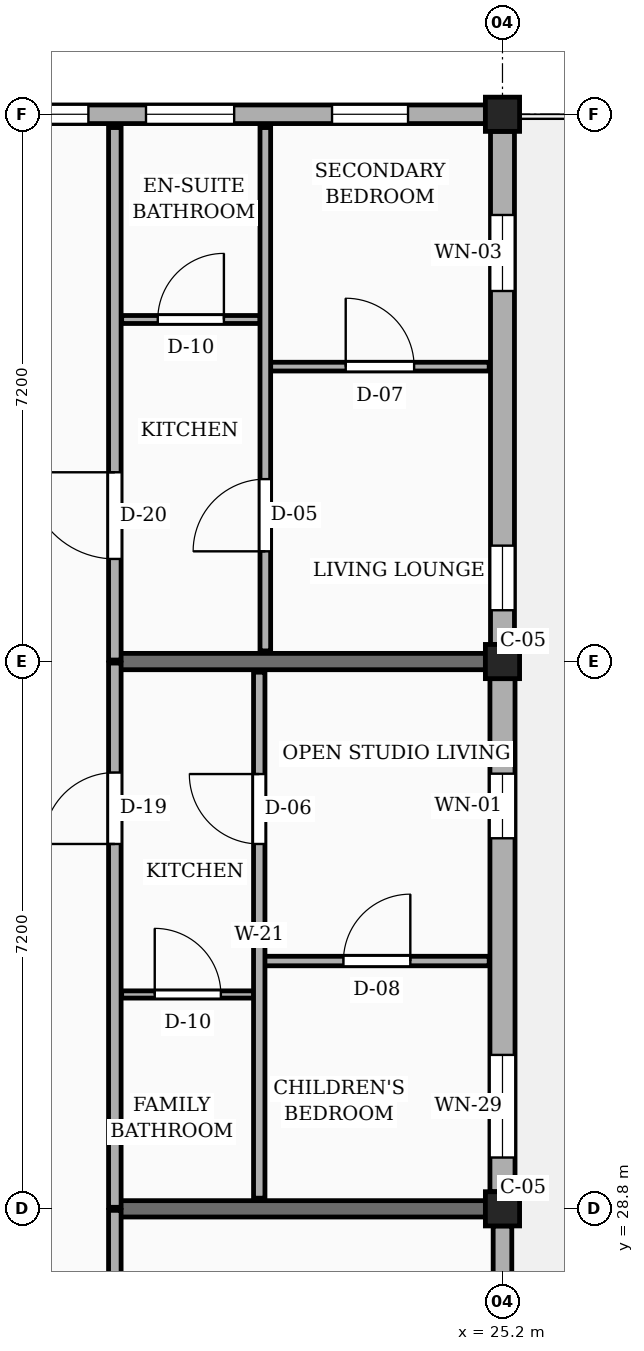
"""IFC4 building model, lengths in metres.
Left out: names, types, materials, properties, quantities, classifications, styles, units other than length and angle.
Written with IfcOpenShell. Run it as: python <this file> out.ifc"""

import sys

from ifc_helpers import new_model, si_unit, direction, frame, frame_2d, origin, origin_2d, place, context, subcontext, project, spatial, rectangle, extrude, element, fill, save


model = new_model("IFC4")
c1 = context("Model", 3, precision=1e-05, world=origin(), true_north=direction((0.0, 1.0)))
c2 = subcontext(c1, "Body", "Model", "MODEL_VIEW")
j1 = project(units=[si_unit("LENGTHUNIT", "METRE"), si_unit("PLANEANGLEUNIT", "RADIAN")], contexts=[c1])
p1 = place(None, origin())
s1 = spatial("IfcSite", under=j1, at=p1, CompositionType="ELEMENT")
p2 = place(p1, origin())
s2 = spatial("IfcBuilding", under=s1, at=p2, CompositionType="ELEMENT")
p3 = place(p2, frame((0.0, 0.0, 36.0)))
s3 = spatial("IfcBuildingStorey", under=s2, at=p3, CompositionType="ELEMENT", Elevation=36.0)
for number, where, z_axis, x_axis in (
    (1, (25.2, 28.8, 0.0), (0.0, 0.0, 1.0), (1.0, 0.0, 0.0)),
    (2, (25.2, 36.0, 0.0), (0.0, 0.0, 1.0), (1.0, 0.0, 0.0)),
    (3, (25.2, 43.2, 0.0), (0.0, 0.0, 1.0), (1.0, 0.0, 0.0)),
):
    element("IfcColumn", number, at=place(p3, frame(where, z_axis=z_axis, x_axis=x_axis)), inside=s3, PredefinedType="COLUMN", context=c2, shape_type="SweptSolid", body=[
        extrude(rectangle(XDim=0.45, YDim=0.45, at=origin_2d()), origin(), (0.0, 0.0, 1.0), 3.15),
    ])
for number, where, z_axis, x_axis in (
    (4, (20.1, 28.8, 0.0), (0.0, 0.0, 1.0), (1.0, 0.0, 0.0)),
    (5, (20.1, 36.0, 0.0), (0.0, 0.0, 1.0), (1.0, 0.0, 0.0)),
):
    element("IfcWall", number, at=place(p3, frame(where, z_axis=z_axis, x_axis=x_axis)), inside=s3, PredefinedType="SOLIDWALL", context=c2, shape_type="SweptSolid", body=[
        extrude(rectangle(XDim=4.875, YDim=0.215, at=frame_2d((2.438, 0.0))), origin(), (0.0, 0.0, 1.0), 2.17),
    ])
p4 = place(p3, frame((25.2, 21.825, 0.0), z_axis=(0.0, 0.0, 1.0), x_axis=(0.0, 1.0, 0.0)))
e6 = element("IfcWall", 6, at=p4, inside=s3, PredefinedType="SOLIDWALL", context=c2, shape_type="SweptSolid", body=[
    extrude(rectangle(XDim=6.75, YDim=0.245, at=frame_2d((3.375, 0.0))), origin(), (0.0, 0.0, 1.0), 2.44),
])
p5 = place(p4, frame((2.8, 0.0, 0.0)))
e7 = element("IfcOpeningElement", 7, at=p5, cuts=e6, PredefinedType="OPENING", context=c2, shape_type="SweptSolid", body=[
    extrude(rectangle(XDim=1.15, YDim=2.12, at=frame_2d((0.575, 1.06))), frame((0.0, 0.133, 0.0), z_axis=(0.0, -1.0, 0.0), x_axis=(1.0, 0.0, 0.0)), (0.0, 0.0, 1.0), 0.265),
])
p6 = place(p4, frame((0.65, 0.0, 0.78)))
e8 = element("IfcOpeningElement", 8, at=p6, cuts=e6, PredefinedType="OPENING", context=c2, shape_type="SweptSolid", body=[
    extrude(rectangle(XDim=1.16, YDim=1.15, at=frame_2d((0.58, 0.575))), frame((0.0, 0.133, 0.0), z_axis=(0.0, -1.0, 0.0), x_axis=(1.0, 0.0, 0.0)), (0.0, 0.0, 1.0), 0.265),
])
p7 = place(p3, frame((25.2, 29.025, 0.0), z_axis=(0.0, 0.0, 1.0), x_axis=(0.0, 1.0, 0.0)))
e9 = element("IfcWall", 9, at=p7, inside=s3, PredefinedType="SOLIDWALL", context=c2, shape_type="SweptSolid", body=[
    extrude(rectangle(XDim=6.75, YDim=0.33, at=frame_2d((3.375, 0.0))), origin(), (0.0, 0.0, 1.0), 2.44),
])
p8 = place(p7, frame((0.45, 0.0, 0.78)))
e10 = element("IfcOpeningElement", 10, at=p8, cuts=e9, PredefinedType="OPENING", context=c2, shape_type="SweptSolid", body=[
    extrude(rectangle(XDim=1.35, YDim=1.44, at=frame_2d((0.675, 0.72))), frame((0.0, 0.175, 0.0), z_axis=(0.0, -1.0, 0.0), x_axis=(1.0, 0.0, 0.0)), (0.0, 0.0, 1.0), 0.35),
])
p9 = place(p7, frame((4.65, 0.0, 0.78)))
e11 = element("IfcOpeningElement", 11, at=p9, cuts=e9, PredefinedType="OPENING", context=c2, shape_type="SweptSolid", body=[
    extrude(rectangle(XDim=0.85, YDim=1.15, at=frame_2d((0.425, 0.575))), frame((0.0, 0.175, 0.0), z_axis=(0.0, -1.0, 0.0), x_axis=(1.0, 0.0, 0.0)), (0.0, 0.0, 1.0), 0.35),
])
p10 = place(p3, frame((25.2, 36.225, 0.0), z_axis=(0.0, 0.0, 1.0), x_axis=(0.0, 1.0, 0.0)))
e12 = element("IfcWall", 12, at=p10, inside=s3, PredefinedType="SOLIDWALL", context=c2, shape_type="SweptSolid", body=[
    extrude(rectangle(XDim=6.75, YDim=0.315, at=frame_2d((3.375, 0.0))), origin(), (0.0, 0.0, 1.0), 2.44),
])
p11 = place(p10, frame((0.45, 0.0, 0.78)))
e13 = element("IfcOpeningElement", 13, at=p11, cuts=e12, PredefinedType="OPENING", context=c2, shape_type="SweptSolid", body=[
    extrude(rectangle(XDim=0.85, YDim=1.15, at=frame_2d((0.425, 0.575))), frame((0.0, 0.167, 0.0), z_axis=(0.0, -1.0, 0.0), x_axis=(1.0, 0.0, 0.0)), (0.0, 0.0, 1.0), 0.335),
])
p12 = place(p10, frame((4.65, 0.0, 0.78)))
e14 = element("IfcOpeningElement", 14, at=p12, cuts=e12, PredefinedType="OPENING", context=c2, shape_type="SweptSolid", body=[
    extrude(rectangle(XDim=1.0, YDim=1.15, at=frame_2d((0.5, 0.575))), frame((0.0, 0.167, 0.0), z_axis=(0.0, -1.0, 0.0), x_axis=(1.0, 0.0, 0.0)), (0.0, 0.0, 1.0), 0.335),
])
p13 = place(p3, frame((24.975, 43.2, 0.0), z_axis=(0.0, 0.0, 1.0), x_axis=(-1.0, 0.0, 0.0)))
e15 = element("IfcWall", 15, at=p13, inside=s3, PredefinedType="SOLIDWALL", context=c2, shape_type="SweptSolid", body=[
    extrude(rectangle(XDim=6.75, YDim=0.245, at=frame_2d((3.375, 0.0))), origin(), (0.0, 0.0, 1.0), 2.44),
])
p14 = place(p13, frame((1.018, 0.0, 0.78)))
e16 = element("IfcOpeningElement", 16, at=p14, cuts=e15, PredefinedType="OPENING", context=c2, shape_type="SweptSolid", body=[
    extrude(rectangle(XDim=1.0, YDim=1.15, at=frame_2d((0.5, 0.575))), frame((0.0, 0.133, 0.0), z_axis=(0.0, -1.0, 0.0), x_axis=(1.0, 0.0, 0.0)), (0.0, 0.0, 1.0), 0.265),
])
p15 = place(p13, frame((3.305, 0.0, 0.78)))
e17 = element("IfcOpeningElement", 17, at=p15, cuts=e15, PredefinedType="OPENING", context=c2, shape_type="SweptSolid", body=[
    extrude(rectangle(XDim=1.16, YDim=1.15, at=frame_2d((0.58, 0.575))), frame((0.0, 0.133, 0.0), z_axis=(0.0, -1.0, 0.0), x_axis=(1.0, 0.0, 0.0)), (0.0, 0.0, 1.0), 0.265),
])
p16 = place(p13, frame((5.222, 0.0, 0.78)))
e18 = element("IfcOpeningElement", 18, at=p16, cuts=e15, PredefinedType="OPENING", context=c2, shape_type="SweptSolid", body=[
    extrude(rectangle(XDim=1.04, YDim=1.26, at=frame_2d((0.52, 0.63))), frame((0.0, 0.133, 0.0), z_axis=(0.0, -1.0, 0.0), x_axis=(1.0, 0.0, 0.0)), (0.0, 0.0, 1.0), 0.265),
])
p17 = place(p3, frame((20.1, 21.62, 0.0), z_axis=(0.0, 0.0, 1.0), x_axis=(0.0, 1.0, 0.0)))
e19 = element("IfcWall", 19, at=p17, inside=s3, PredefinedType="PARTITIONING", context=c2, shape_type="SweptSolid", body=[
    extrude(rectangle(XDim=7.16, YDim=0.165, at=frame_2d((3.58, 0.0))), origin(), (0.0, 0.0, 1.0), 2.305),
])
p18 = place(p17, frame((4.33, 0.0, 0.0)))
e20 = element("IfcOpeningElement", 20, at=p18, cuts=e19, PredefinedType="OPENING", context=c2, shape_type="SweptSolid", body=[
    extrude(rectangle(XDim=1.1, YDim=2.15, at=frame_2d((0.55, 1.075))), frame((0.0, 0.093, 0.0), z_axis=(0.0, -1.0, 0.0), x_axis=(1.0, 0.0, 0.0)), (0.0, 0.0, 1.0), 0.185),
])
p19 = place(p3, frame((20.1, 28.82, 0.0), z_axis=(0.0, 0.0, 1.0), x_axis=(0.0, 1.0, 0.0)))
e21 = element("IfcWall", 21, at=p19, inside=s3, PredefinedType="PARTITIONING", context=c2, shape_type="SweptSolid", body=[
    extrude(rectangle(XDim=7.16, YDim=0.165, at=frame_2d((3.58, 0.0))), origin(), (0.0, 0.0, 1.0), 2.305),
])
p20 = place(p19, frame((4.78, 0.0, 0.0)))
e22 = element("IfcOpeningElement", 22, at=p20, cuts=e21, PredefinedType="OPENING", context=c2, shape_type="SweptSolid", body=[
    extrude(rectangle(XDim=0.94, YDim=2.12, at=frame_2d((0.47, 1.06))), frame((0.0, 0.093, 0.0), z_axis=(0.0, -1.0, 0.0), x_axis=(1.0, 0.0, 0.0)), (0.0, 0.0, 1.0), 0.185),
])
p21 = place(p3, frame((20.1, 36.02, 0.0), z_axis=(0.0, 0.0, 1.0), x_axis=(0.0, 1.0, 0.0)))
e23 = element("IfcWall", 23, at=p21, inside=s3, PredefinedType="PARTITIONING", context=c2, shape_type="SweptSolid", body=[
    extrude(rectangle(XDim=7.005, YDim=0.165, at=frame_2d((3.502, 0.0))), origin(), (0.0, 0.0, 1.0), 2.305),
])
p22 = place(p21, frame((1.33, 0.0, 0.0)))
e24 = element("IfcOpeningElement", 24, at=p22, cuts=e23, PredefinedType="OPENING", context=c2, shape_type="SweptSolid", body=[
    extrude(rectangle(XDim=1.14, YDim=2.18, at=frame_2d((0.57, 1.09))), frame((0.0, 0.093, 0.0), z_axis=(0.0, -1.0, 0.0), x_axis=(1.0, 0.0, 0.0)), (0.0, 0.0, 1.0), 0.185),
])
p23 = place(p3, frame((22.07, 32.06, 0.0), z_axis=(0.0, 0.0, 1.0), x_axis=(1.0, 0.0, 0.0)))
e25 = element("IfcWall", 25, at=p23, inside=s3, PredefinedType="PARTITIONING", context=c2, shape_type="SweptSolid", body=[
    extrude(rectangle(XDim=2.955, YDim=0.125, at=frame_2d((1.478, 0.0))), origin(), (0.0, 0.0, 1.0), 2.305),
])
p24 = place(p23, frame((1.038, 0.0, 0.0)))
e26 = element("IfcOpeningElement", 26, at=p24, cuts=e25, PredefinedType="OPENING", context=c2, shape_type="SweptSolid", body=[
    extrude(rectangle(XDim=0.88, YDim=2.08, at=frame_2d((0.44, 1.04))), frame((0.0, 0.073, 0.0), z_axis=(0.0, -1.0, 0.0), x_axis=(1.0, 0.0, 0.0)), (0.0, 0.0, 1.0), 0.145),
])
p25 = place(p3, frame((20.19, 31.62, 0.0), z_axis=(0.0, 0.0, 1.0), x_axis=(1.0, 0.0, 0.0)))
e27 = element("IfcWall", 27, at=p25, inside=s3, PredefinedType="PARTITIONING", context=c2, shape_type="SweptSolid", body=[
    extrude(rectangle(XDim=1.74, YDim=0.095, at=frame_2d((0.87, 0.0))), origin(), (0.0, 0.0, 1.0), 2.305),
])
p26 = place(p25, frame((0.435, 0.0, 0.0)))
e28 = element("IfcOpeningElement", 28, at=p26, cuts=e27, PredefinedType="OPENING", context=c2, shape_type="SweptSolid", body=[
    extrude(rectangle(XDim=0.87, YDim=2.05, at=frame_2d((0.435, 1.025))), frame((0.0, 0.058, 0.0), z_axis=(0.0, -1.0, 0.0), x_axis=(1.0, 0.0, 0.0)), (0.0, 0.0, 1.0), 0.115),
])
p27 = place(p3, frame((22.0, 28.94, 0.0), z_axis=(0.0, 0.0, 1.0), x_axis=(0.0, 1.0, 0.0)))
e29 = element("IfcWall", 29, at=p27, inside=s3, PredefinedType="PARTITIONING", context=c2, shape_type="SweptSolid", body=[
    extrude(rectangle(XDim=6.92, YDim=0.15, at=frame_2d((3.46, 0.0))), origin(), (0.0, 0.0, 1.0), 2.305),
])
p28 = place(p27, frame((4.66, 0.0, 0.0)))
e30 = element("IfcOpeningElement", 30, at=p28, cuts=e29, PredefinedType="OPENING", context=c2, shape_type="SweptSolid", body=[
    extrude(rectangle(XDim=0.92, YDim=2.1, at=frame_2d((0.46, 1.05))), frame((0.0, 0.085, 0.0), z_axis=(0.0, -1.0, 0.0), x_axis=(1.0, 0.0, 0.0)), (0.0, 0.0, 1.0), 0.17),
])
p29 = place(p3, frame((22.15, 39.88, 0.0), z_axis=(0.0, 0.0, 1.0), x_axis=(1.0, 0.0, 0.0)))
e31 = element("IfcWall", 31, at=p29, inside=s3, PredefinedType="PARTITIONING", context=c2, shape_type="SweptSolid", body=[
    extrude(rectangle(XDim=2.875, YDim=0.115, at=frame_2d((1.438, 0.0))), origin(), (0.0, 0.0, 1.0), 2.305),
])
p30 = place(p29, frame((0.988, 0.0, 0.0)))
e32 = element("IfcOpeningElement", 32, at=p30, cuts=e31, PredefinedType="OPENING", context=c2, shape_type="SweptSolid", body=[
    extrude(rectangle(XDim=0.9, YDim=2.1, at=frame_2d((0.45, 1.05))), frame((0.0, 0.067, 0.0), z_axis=(0.0, -1.0, 0.0), x_axis=(1.0, 0.0, 0.0)), (0.0, 0.0, 1.0), 0.135),
])
p31 = place(p3, frame((20.19, 40.5, 0.0), z_axis=(0.0, 0.0, 1.0), x_axis=(1.0, 0.0, 0.0)))
e33 = element("IfcWall", 33, at=p31, inside=s3, PredefinedType="PARTITIONING", context=c2, shape_type="SweptSolid", body=[
    extrude(rectangle(XDim=1.82, YDim=0.105, at=frame_2d((0.91, 0.0))), origin(), (0.0, 0.0, 1.0), 2.305),
])
p32 = place(p31, frame((0.475, 0.0, 0.0)))
e34 = element("IfcOpeningElement", 34, at=p32, cuts=e33, PredefinedType="OPENING", context=c2, shape_type="SweptSolid", body=[
    extrude(rectangle(XDim=0.87, YDim=2.05, at=frame_2d((0.435, 1.025))), frame((0.0, 0.062, 0.0), z_axis=(0.0, -1.0, 0.0), x_axis=(1.0, 0.0, 0.0)), (0.0, 0.0, 1.0), 0.125),
])
p33 = place(p3, frame((22.08, 36.14, 0.0), z_axis=(0.0, 0.0, 1.0), x_axis=(0.0, 1.0, 0.0)))
e35 = element("IfcWall", 35, at=p33, inside=s3, PredefinedType="PARTITIONING", context=c2, shape_type="SweptSolid", body=[
    extrude(rectangle(XDim=6.885, YDim=0.14, at=frame_2d((3.442, 0.0))), origin(), (0.0, 0.0, 1.0), 2.305),
])
p34 = place(p33, frame((1.31, 0.0, 0.0)))
e36 = element("IfcOpeningElement", 36, at=p34, cuts=e35, PredefinedType="OPENING", context=c2, shape_type="SweptSolid", body=[
    extrude(rectangle(XDim=0.95, YDim=2.1, at=frame_2d((0.475, 1.05))), frame((0.0, 0.08, 0.0), z_axis=(0.0, -1.0, 0.0), x_axis=(1.0, 0.0, 0.0)), (0.0, 0.0, 1.0), 0.16),
])
p35 = place(p8, origin())
e37 = element("IfcWindow", 37, at=p35, inside=s3, PartitioningType="SINGLE_PANEL", PredefinedType="WINDOW", context=c2, shape_type="SweptSolid", body=[
    extrude(rectangle(XDim=1.35, YDim=1.44, at=frame_2d((0.675, 0.72))), frame((0.0, 0.03, 0.0), z_axis=(0.0, -1.0, 0.0), x_axis=(1.0, 0.0, 0.0)), (0.0, 0.0, 1.0), 0.06),
])
fill(e10, e37)
p36 = place(p9, origin())
e38 = element("IfcWindow", 38, at=p36, inside=s3, PartitioningType="SINGLE_PANEL", PredefinedType="WINDOW", context=c2, shape_type="SweptSolid", body=[
    extrude(rectangle(XDim=0.85, YDim=1.15, at=frame_2d((0.425, 0.575))), frame((0.0, 0.03, 0.0), z_axis=(0.0, -1.0, 0.0), x_axis=(1.0, 0.0, 0.0)), (0.0, 0.0, 1.0), 0.06),
])
fill(e11, e38)
p37 = place(p11, origin())
e39 = element("IfcWindow", 39, at=p37, inside=s3, PartitioningType="SINGLE_PANEL", PredefinedType="WINDOW", context=c2, shape_type="SweptSolid", body=[
    extrude(rectangle(XDim=0.85, YDim=1.15, at=frame_2d((0.425, 0.575))), frame((0.0, 0.03, 0.0), z_axis=(0.0, -1.0, 0.0), x_axis=(1.0, 0.0, 0.0)), (0.0, 0.0, 1.0), 0.06),
])
fill(e13, e39)
p38 = place(p12, origin())
e40 = element("IfcWindow", 40, at=p38, inside=s3, PartitioningType="SINGLE_PANEL", PredefinedType="WINDOW", context=c2, shape_type="SweptSolid", body=[
    extrude(rectangle(XDim=1.0, YDim=1.15, at=frame_2d((0.5, 0.575))), frame((0.0, 0.03, 0.0), z_axis=(0.0, -1.0, 0.0), x_axis=(1.0, 0.0, 0.0)), (0.0, 0.0, 1.0), 0.06),
])
fill(e14, e40)
p39 = place(p14, origin())
e41 = element("IfcWindow", 41, at=p39, inside=s3, PartitioningType="SINGLE_PANEL", PredefinedType="WINDOW", context=c2, shape_type="SweptSolid", body=[
    extrude(rectangle(XDim=1.0, YDim=1.15, at=frame_2d((0.5, 0.575))), frame((0.0, 0.03, 0.0), z_axis=(0.0, -1.0, 0.0), x_axis=(1.0, 0.0, 0.0)), (0.0, 0.0, 1.0), 0.06),
])
fill(e16, e41)
p40 = place(p15, origin())
e42 = element("IfcWindow", 42, at=p40, inside=s3, PartitioningType="SINGLE_PANEL", PredefinedType="WINDOW", context=c2, shape_type="SweptSolid", body=[
    extrude(rectangle(XDim=1.16, YDim=1.15, at=frame_2d((0.58, 0.575))), frame((0.0, 0.03, 0.0), z_axis=(0.0, -1.0, 0.0), x_axis=(1.0, 0.0, 0.0)), (0.0, 0.0, 1.0), 0.06),
])
fill(e17, e42)
p41 = place(p16, origin())
e43 = element("IfcWindow", 43, at=p41, inside=s3, PartitioningType="SINGLE_PANEL", PredefinedType="WINDOW", context=c2, shape_type="SweptSolid", body=[
    extrude(rectangle(XDim=1.04, YDim=1.26, at=frame_2d((0.52, 0.63))), frame((0.0, 0.03, 0.0), z_axis=(0.0, -1.0, 0.0), x_axis=(1.0, 0.0, 0.0)), (0.0, 0.0, 1.0), 0.06),
])
fill(e18, e43)
p42 = place(p20, origin())
e44 = element("IfcDoor", 44, at=p42, inside=s3, OperationType="SINGLE_SWING_LEFT", PredefinedType="DOOR", context=c2, shape_type="SweptSolid", body=[
    extrude(rectangle(XDim=0.94, YDim=2.12, at=frame_2d((0.47, 1.06))), frame((0.0, 0.025, 0.0), z_axis=(0.0, -1.0, 0.0), x_axis=(1.0, 0.0, 0.0)), (0.0, 0.0, 1.0), 0.05),
])
fill(e22, e44)
p43 = place(p22, origin())
e45 = element("IfcDoor", 45, at=p43, inside=s3, OperationType="SINGLE_SWING_RIGHT", PredefinedType="DOOR", context=c2, shape_type="SweptSolid", body=[
    extrude(rectangle(XDim=1.14, YDim=2.18, at=frame_2d((0.57, 1.09))), frame((0.0, 0.025, 0.0), z_axis=(0.0, -1.0, 0.0), x_axis=(1.0, 0.0, 0.0)), (0.0, 0.0, 1.0), 0.05),
])
fill(e24, e45)
p44 = place(p24, origin())
e46 = element("IfcDoor", 46, at=p44, inside=s3, OperationType="SINGLE_SWING_RIGHT", PredefinedType="DOOR", context=c2, shape_type="SweptSolid", body=[
    extrude(rectangle(XDim=0.88, YDim=2.08, at=frame_2d((0.44, 1.04))), frame((0.0, 0.025, 0.0), z_axis=(0.0, -1.0, 0.0), x_axis=(1.0, 0.0, 0.0)), (0.0, 0.0, 1.0), 0.05),
])
fill(e26, e46)
p45 = place(p26, origin())
e47 = element("IfcDoor", 47, at=p45, inside=s3, OperationType="SINGLE_SWING_LEFT", PredefinedType="DOOR", context=c2, shape_type="SweptSolid", body=[
    extrude(rectangle(XDim=0.87, YDim=2.05, at=frame_2d((0.435, 1.025))), frame((0.0, 0.025, 0.0), z_axis=(0.0, -1.0, 0.0), x_axis=(1.0, 0.0, 0.0)), (0.0, 0.0, 1.0), 0.05),
])
fill(e28, e47)
p46 = place(p28, origin())
e48 = element("IfcDoor", 48, at=p46, inside=s3, OperationType="SINGLE_SWING_RIGHT", PredefinedType="DOOR", context=c2, shape_type="SweptSolid", body=[
    extrude(rectangle(XDim=0.92, YDim=2.1, at=frame_2d((0.46, 1.05))), frame((0.0, 0.025, 0.0), z_axis=(0.0, -1.0, 0.0), x_axis=(1.0, 0.0, 0.0)), (0.0, 0.0, 1.0), 0.05),
])
fill(e30, e48)
p47 = place(p30, origin())
e49 = element("IfcDoor", 49, at=p47, inside=s3, OperationType="SINGLE_SWING_LEFT", PredefinedType="DOOR", context=c2, shape_type="SweptSolid", body=[
    extrude(rectangle(XDim=0.9, YDim=2.1, at=frame_2d((0.45, 1.05))), frame((0.0, 0.025, 0.0), z_axis=(0.0, -1.0, 0.0), x_axis=(1.0, 0.0, 0.0)), (0.0, 0.0, 1.0), 0.05),
])
fill(e32, e49)
p48 = place(p32, origin())
e50 = element("IfcDoor", 50, at=p48, inside=s3, OperationType="SINGLE_SWING_RIGHT", PredefinedType="DOOR", context=c2, shape_type="SweptSolid", body=[
    extrude(rectangle(XDim=0.87, YDim=2.05, at=frame_2d((0.435, 1.025))), frame((0.0, 0.025, 0.0), z_axis=(0.0, -1.0, 0.0), x_axis=(1.0, 0.0, 0.0)), (0.0, 0.0, 1.0), 0.05),
])
fill(e34, e50)
p49 = place(p34, origin())
e51 = element("IfcDoor", 51, at=p49, inside=s3, OperationType="SINGLE_SWING_LEFT", PredefinedType="DOOR", context=c2, shape_type="SweptSolid", body=[
    extrude(rectangle(XDim=0.95, YDim=2.1, at=frame_2d((0.475, 1.05))), frame((0.0, 0.025, 0.0), z_axis=(0.0, -1.0, 0.0), x_axis=(1.0, 0.0, 0.0)), (0.0, 0.0, 1.0), 0.05),
])
fill(e36, e51)
save(model, sys.argv[1])
